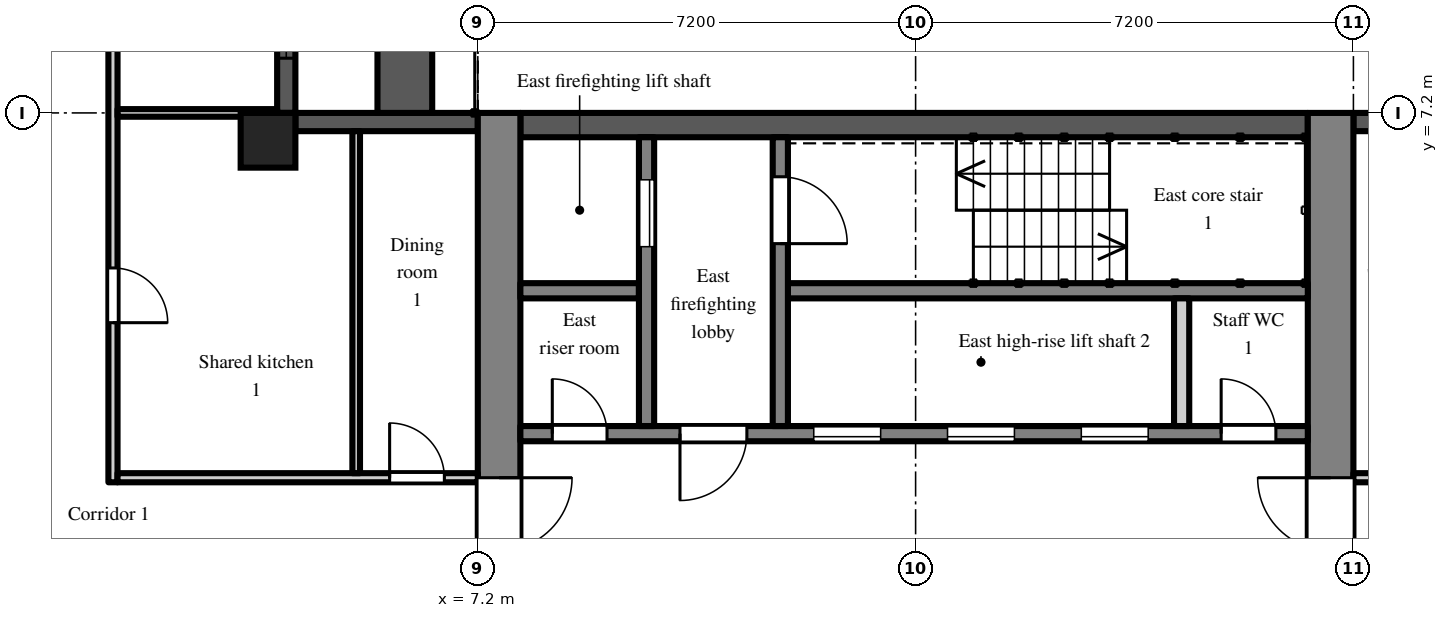
"""IFC4 building model, lengths in metres.
Left out: names, types, materials, properties, quantities, classifications, styles, units other than length and angle.
Written with IfcOpenShell. Run it as: python <this file> out.ifc"""

import sys

from ifc_helpers import new_model, si_unit, direction, frame, frame_2d, origin, origin_2d, place, context, subcontext, project, spatial, rectangle, extrude, element, fill, save


model = new_model("IFC4")
c1 = context("Model", 3, precision=1e-05, world=origin(), true_north=direction((0.0, 1.0)))
c2 = subcontext(c1, "Body", "Model", "MODEL_VIEW")
j1 = project(units=[si_unit("LENGTHUNIT", "METRE"), si_unit("PLANEANGLEUNIT", "RADIAN")], contexts=[c1])
p1 = place(None, origin())
s1 = spatial("IfcSite", under=j1, at=p1, CompositionType="ELEMENT")
p2 = place(p1, origin())
s2 = spatial("IfcBuilding", under=s1, at=p2, CompositionType="ELEMENT")
p3 = place(p2, frame((0.0, 0.0, 225.9)))
s3 = spatial("IfcBuildingStorey", under=s2, at=p3, CompositionType="ELEMENT", Elevation=225.9)
p4 = place(p3, frame((3.75, 6.75, 0.0), z_axis=(0.0, 0.0, 1.0), x_axis=(1.0, 0.0, 0.0)))
e1 = element("IfcColumn", 1, at=p4, inside=s3, PredefinedType="COLUMN", context=c2, shape_type="SweptSolid", body=[
    extrude(rectangle(XDim=0.9, YDim=0.9, at=origin_2d()), origin(), (0.0, 0.0, 1.0), 3.0),
])
p5 = place(p3, frame((24.3, 7.05, 0.0), z_axis=(0.0, 0.0, 1.0), x_axis=(-1.0, 0.0, 0.0)))
e2 = element("IfcWall", 2, at=p5, inside=s3, PredefinedType="SOLIDWALL", context=c2, shape_type="SweptSolid", body=[
    extrude(rectangle(XDim=2.7, YDim=0.3, at=frame_2d((1.35, 0.0))), origin(), (0.0, 0.0, 1.0), 2.3),
])
p6 = place(p5, frame((0.75, 0.0, 0.2)))
e3 = element("IfcOpeningElement", 3, at=p6, cuts=e2, PredefinedType="OPENING", context=c2, shape_type="SweptSolid", body=[
    extrude(rectangle(XDim=1.2, YDim=1.85, at=frame_2d((0.6, 0.925))), frame((0.0, 0.16, 0.0), z_axis=(0.0, -1.0, 0.0), x_axis=(1.0, 0.0, 0.0)), (0.0, 0.0, 1.0), 0.32),
])
p7 = place(p3, frame((7.2, 7.05, 0.0), z_axis=(0.0, 0.0, 1.0), x_axis=(-1.0, 0.0, 0.0)))
e4 = element("IfcWall", 4, at=p7, inside=s3, PredefinedType="SOLIDWALL", context=c2, shape_type="SweptSolid", body=[
    extrude(rectangle(XDim=3.0, YDim=0.3, at=frame_2d((1.5, 0.0))), origin(), (0.0, 0.0, 1.0), 2.3),
])
p8 = place(p3, frame((4.05, 7.2, 0.0), z_axis=(0.0, 0.0, 1.0), x_axis=(0.0, 1.0, 0.0)))
e5 = element("IfcWall", 5, at=p8, inside=s3, PredefinedType="SOLIDWALL", context=c2, shape_type="SweptSolid", body=[
    extrude(rectangle(XDim=7.2, YDim=0.3, at=frame_2d((3.6, 0.0))), origin(), (0.0, 0.0, 1.0), 2.3),
])
p9 = place(p8, frame((3.0, 0.0, 0.0)))
e6 = element("IfcOpeningElement", 6, at=p9, cuts=e5, PredefinedType="OPENING", context=c2, shape_type="SweptSolid", body=[
    extrude(rectangle(XDim=1.2, YDim=2.05, at=frame_2d((0.6, 1.025))), frame((0.0, 0.16, 0.0), z_axis=(0.0, -1.0, 0.0), x_axis=(1.0, 0.0, 0.0)), (0.0, 0.0, 1.0), 0.32),
])
p10 = place(p8, frame((0.9, 0.0, 0.2)))
e7 = element("IfcOpeningElement", 7, at=p10, cuts=e5, PredefinedType="OPENING", context=c2, shape_type="SweptSolid", body=[
    extrude(rectangle(XDim=1.8, YDim=1.85, at=frame_2d((0.9, 0.925))), frame((0.0, 0.16, 0.0), z_axis=(0.0, -1.0, 0.0), x_axis=(1.0, 0.0, 0.0)), (0.0, 0.0, 1.0), 0.32),
])
p11 = place(p8, frame((4.5, 0.0, 0.2)))
e8 = element("IfcOpeningElement", 8, at=p11, cuts=e5, PredefinedType="OPENING", context=c2, shape_type="SweptSolid", body=[
    extrude(rectangle(XDim=1.8, YDim=1.85, at=frame_2d((0.9, 0.925))), frame((0.0, 0.16, 0.0), z_axis=(0.0, -1.0, 0.0), x_axis=(1.0, 0.0, 0.0)), (0.0, 0.0, 1.0), 0.32),
])
p12 = place(p3, frame((6.0, 7.2, 0.0), z_axis=(0.0, 0.0, 1.0), x_axis=(0.0, 1.0, 0.0)))
e9 = element("IfcWall", 9, at=p12, inside=s3, PredefinedType="PARAPET", context=c2, shape_type="SweptSolid", body=[
    extrude(rectangle(XDim=7.2, YDim=0.9, at=frame_2d((3.6, 0.0))), origin(), (0.0, 0.0, 1.0), 0.8),
])
p13 = place(p3, frame((7.55, -7.2, 0.0), z_axis=(0.0, 0.0, 1.0), x_axis=(0.0, 1.0, 0.0)))
e10 = element("IfcWall", 10, at=p13, inside=s3, PredefinedType="SHEAR", context=c2, shape_type="SweptSolid", body=[
    extrude(rectangle(XDim=14.4, YDim=0.7, at=frame_2d((7.2, 0.0))), origin(), (0.0, 0.0, 1.0), 2.6),
])
p14 = place(p13, frame((6.0, 0.0, 0.0)))
e11 = element("IfcOpeningElement", 11, at=p14, cuts=e10, PredefinedType="OPENING", context=c2, shape_type="SweptSolid", body=[
    extrude(rectangle(XDim=2.4, YDim=2.2, at=frame_2d((1.2, 1.1))), frame((0.0, 0.36, 0.0), z_axis=(0.0, -1.0, 0.0), x_axis=(1.0, 0.0, 0.0)), (0.0, 0.0, 1.0), 0.72),
])
p15 = place(p3, frame((21.225, -7.2, 0.0), z_axis=(0.0, 0.0, 1.0), x_axis=(0.0, 1.0, 0.0)))
e12 = element("IfcWall", 12, at=p15, inside=s3, PredefinedType="SHEAR", context=c2, shape_type="SweptSolid", body=[
    extrude(rectangle(XDim=14.4, YDim=0.75, at=frame_2d((7.2, 0.0))), origin(), (0.0, 0.0, 1.0), 2.6),
])
p16 = place(p15, frame((6.0, 0.0, 0.0)))
e13 = element("IfcOpeningElement", 13, at=p16, cuts=e12, PredefinedType="OPENING", context=c2, shape_type="SweptSolid", body=[
    extrude(rectangle(XDim=2.4, YDim=2.2, at=frame_2d((1.2, 1.1))), frame((0.0, 0.385, 0.0), z_axis=(0.0, -1.0, 0.0), x_axis=(1.0, 0.0, 0.0)), (0.0, 0.0, 1.0), 0.77),
])
p17 = place(p3, frame((7.9, 7.0, 0.0), z_axis=(0.0, 0.0, 1.0), x_axis=(1.0, 0.0, 0.0)))
e14 = element("IfcWall", 14, at=p17, inside=s3, PredefinedType="SHEAR", context=c2, shape_type="SweptSolid", body=[
    extrude(rectangle(XDim=12.95, YDim=0.4, at=frame_2d((6.475, 0.0))), origin(), (0.0, 0.0, 1.0), 2.6),
])
p18 = place(p3, frame((7.9, 1.925, 0.0), z_axis=(0.0, 0.0, 1.0), x_axis=(1.0, 0.0, 0.0)))
e15 = element("IfcWall", 15, at=p18, inside=s3, PredefinedType="SHEAR", context=c2, shape_type="SweptSolid", body=[
    extrude(rectangle(XDim=12.95, YDim=0.25, at=frame_2d((6.475, 0.0))), origin(), (0.0, 0.0, 1.0), 2.6),
])
p19 = place(p18, frame((4.825, 0.0, 0.0)))
e16 = element("IfcOpeningElement", 16, at=p19, cuts=e15, PredefinedType="OPENING", context=c2, shape_type="SweptSolid", body=[
    extrude(rectangle(XDim=1.1, YDim=2.1, at=frame_2d((0.55, 1.05))), frame((0.0, 0.135, 0.0), z_axis=(0.0, -1.0, 0.0), x_axis=(1.0, 0.0, 0.0)), (0.0, 0.0, 1.0), 0.27),
])
p20 = place(p18, frame((7.025, 0.0, 0.0)))
e17 = element("IfcOpeningElement", 17, at=p20, cuts=e15, PredefinedType="OPENING", context=c2, shape_type="SweptSolid", body=[
    extrude(rectangle(XDim=1.1, YDim=2.1, at=frame_2d((0.55, 1.05))), frame((0.0, 0.135, 0.0), z_axis=(0.0, -1.0, 0.0), x_axis=(1.0, 0.0, 0.0)), (0.0, 0.0, 1.0), 0.27),
])
p21 = place(p18, frame((9.225, 0.0, 0.0)))
e18 = element("IfcOpeningElement", 18, at=p21, cuts=e15, PredefinedType="OPENING", context=c2, shape_type="SweptSolid", body=[
    extrude(rectangle(XDim=1.1, YDim=2.1, at=frame_2d((0.55, 1.05))), frame((0.0, 0.135, 0.0), z_axis=(0.0, -1.0, 0.0), x_axis=(1.0, 0.0, 0.0)), (0.0, 0.0, 1.0), 0.27),
])
p22 = place(p18, frame((0.525, 0.0, 0.0)))
e19 = element("IfcOpeningElement", 19, at=p22, cuts=e15, PredefinedType="OPENING", context=c2, shape_type="SweptSolid", body=[
    extrude(rectangle(XDim=0.9, YDim=2.1, at=frame_2d((0.45, 1.05))), frame((0.0, 0.135, 0.0), z_axis=(0.0, -1.0, 0.0), x_axis=(1.0, 0.0, 0.0)), (0.0, 0.0, 1.0), 0.27),
])
p23 = place(p18, frame((2.625, 0.0, 0.0)))
e20 = element("IfcOpeningElement", 20, at=p23, cuts=e15, PredefinedType="OPENING", context=c2, shape_type="SweptSolid", body=[
    extrude(rectangle(XDim=1.1, YDim=2.1, at=frame_2d((0.55, 1.05))), frame((0.0, 0.135, 0.0), z_axis=(0.0, -1.0, 0.0), x_axis=(1.0, 0.0, 0.0)), (0.0, 0.0, 1.0), 0.27),
])
p24 = place(p18, frame((11.525, 0.0, 0.0)))
e21 = element("IfcOpeningElement", 21, at=p24, cuts=e15, PredefinedType="OPENING", context=c2, shape_type="SweptSolid", body=[
    extrude(rectangle(XDim=0.9, YDim=2.1, at=frame_2d((0.45, 1.05))), frame((0.0, 0.135, 0.0), z_axis=(0.0, -1.0, 0.0), x_axis=(1.0, 0.0, 0.0)), (0.0, 0.0, 1.0), 0.27),
])
p25 = place(p3, frame((7.9, 4.275, 0.0), z_axis=(0.0, 0.0, 1.0), x_axis=(1.0, 0.0, 0.0)))
e22 = element("IfcWall", 22, at=p25, inside=s3, PredefinedType="SHEAR", context=c2, shape_type="SweptSolid", body=[
    extrude(rectangle(XDim=1.95, YDim=0.25, at=frame_2d((0.975, 0.0))), origin(), (0.0, 0.0, 1.0), 2.6),
])
p26 = place(p3, frame((12.3, 4.275, 0.0), z_axis=(0.0, 0.0, 1.0), x_axis=(1.0, 0.0, 0.0)))
e23 = element("IfcWall", 23, at=p26, inside=s3, PredefinedType="SHEAR", context=c2, shape_type="SweptSolid", body=[
    extrude(rectangle(XDim=8.55, YDim=0.25, at=frame_2d((4.275, 0.0))), origin(), (0.0, 0.0, 1.0), 2.6),
])
p27 = place(p3, frame((9.975, 2.05, 0.0), z_axis=(0.0, 0.0, 1.0), x_axis=(0.0, 1.0, 0.0)))
e24 = element("IfcWall", 24, at=p27, inside=s3, PredefinedType="SHEAR", context=c2, shape_type="SweptSolid", body=[
    extrude(rectangle(XDim=4.75, YDim=0.25, at=frame_2d((2.375, 0.0))), origin(), (0.0, 0.0, 1.0), 2.6),
])
p28 = place(p27, frame((2.95, 0.0, 0.0)))
e25 = element("IfcOpeningElement", 25, at=p28, cuts=e24, PredefinedType="OPENING", context=c2, shape_type="SweptSolid", body=[
    extrude(rectangle(XDim=1.1, YDim=2.1, at=frame_2d((0.55, 1.05))), frame((0.0, 0.135, 0.0), z_axis=(0.0, -1.0, 0.0), x_axis=(1.0, 0.0, 0.0)), (0.0, 0.0, 1.0), 0.27),
])
p29 = place(p3, frame((12.175, 2.05, 0.0), z_axis=(0.0, 0.0, 1.0), x_axis=(0.0, 1.0, 0.0)))
e26 = element("IfcWall", 26, at=p29, inside=s3, PredefinedType="SHEAR", context=c2, shape_type="SweptSolid", body=[
    extrude(rectangle(XDim=4.75, YDim=0.25, at=frame_2d((2.375, 0.0))), origin(), (0.0, 0.0, 1.0), 2.6),
])
p30 = place(p29, frame((3.0, 0.0, 0.0)))
e27 = element("IfcOpeningElement", 27, at=p30, cuts=e26, PredefinedType="OPENING", context=c2, shape_type="SweptSolid", body=[
    extrude(rectangle(XDim=1.1, YDim=2.1, at=frame_2d((0.55, 1.05))), frame((0.0, 0.135, 0.0), z_axis=(0.0, -1.0, 0.0), x_axis=(1.0, 0.0, 0.0)), (0.0, 0.0, 1.0), 0.27),
])
p31 = place(p3, frame((18.775, 2.05, 0.0), z_axis=(0.0, 0.0, 1.0), x_axis=(0.0, 1.0, 0.0)))
e28 = element("IfcWall", 28, at=p31, inside=s3, PredefinedType="PARTITIONING", context=c2, shape_type="SweptSolid", body=[
    extrude(rectangle(XDim=2.1, YDim=0.25, at=frame_2d((1.05, 0.0))), origin(), (0.0, 0.0, 1.0), 2.6),
])
p32 = place(p3, frame((1.2, 1.125, 0.0), z_axis=(0.0, 0.0, 1.0), x_axis=(0.0, 1.0, 0.0)))
e29 = element("IfcWall", 29, at=p32, inside=s3, PredefinedType="PARTITIONING", context=c2, shape_type="SweptSolid", body=[
    extrude(rectangle(XDim=18.4, YDim=0.15, at=frame_2d((9.2, 0.0))), origin(), (0.0, 0.0, 1.0), 2.6),
])
p33 = place(p32, frame((2.625, 0.0, 0.0)))
e30 = element("IfcOpeningElement", 30, at=p33, cuts=e29, PredefinedType="OPENING", context=c2, shape_type="SweptSolid", body=[
    extrude(rectangle(XDim=0.9, YDim=2.1, at=frame_2d((0.45, 1.05))), frame((0.0, 0.085, 0.0), z_axis=(0.0, -1.0, 0.0), x_axis=(1.0, 0.0, 0.0)), (0.0, 0.0, 1.0), 0.17),
])
p34 = place(p32, frame((7.425, 0.0, 0.0)))
e31 = element("IfcOpeningElement", 31, at=p34, cuts=e29, PredefinedType="OPENING", context=c2, shape_type="SweptSolid", body=[
    extrude(rectangle(XDim=0.9, YDim=2.1, at=frame_2d((0.45, 1.05))), frame((0.0, 0.085, 0.0), z_axis=(0.0, -1.0, 0.0), x_axis=(1.0, 0.0, 0.0)), (0.0, 0.0, 1.0), 0.17),
])
p35 = place(p32, frame((13.475, 0.0, 0.0)))
e32 = element("IfcOpeningElement", 32, at=p35, cuts=e29, PredefinedType="OPENING", context=c2, shape_type="SweptSolid", body=[
    extrude(rectangle(XDim=1.0, YDim=2.1, at=frame_2d((0.5, 1.05))), frame((0.0, 0.085, 0.0), z_axis=(0.0, -1.0, 0.0), x_axis=(1.0, 0.0, 0.0)), (0.0, 0.0, 1.0), 0.17),
])
p36 = place(p3, frame((1.275, 1.2, 0.0), z_axis=(0.0, 0.0, 1.0), x_axis=(1.0, 0.0, 0.0)))
e33 = element("IfcWall", 33, at=p36, inside=s3, PredefinedType="PARTITIONING", context=c2, shape_type="SweptSolid", body=[
    extrude(rectangle(XDim=5.925, YDim=0.15, at=frame_2d((2.962, 0.0))), origin(), (0.0, 0.0, 1.0), 2.6),
])
p37 = place(p36, frame((4.475, 0.0, 0.0)))
e34 = element("IfcOpeningElement", 34, at=p37, cuts=e33, PredefinedType="OPENING", context=c2, shape_type="SweptSolid", body=[
    extrude(rectangle(XDim=0.9, YDim=2.1, at=frame_2d((0.45, 1.05))), frame((0.0, 0.085, 0.0), z_axis=(0.0, -1.0, 0.0), x_axis=(1.0, 0.0, 0.0)), (0.0, 0.0, 1.0), 0.17),
])
p38 = place(p3, frame((1.275, 7.2, 0.0), z_axis=(0.0, 0.0, 1.0), x_axis=(1.0, 0.0, 0.0)))
e35 = element("IfcWall", 35, at=p38, inside=s3, PredefinedType="PARTITIONING", context=c2, shape_type="SweptSolid", body=[
    extrude(rectangle(XDim=2.625, YDim=0.125, at=frame_2d((1.312, 0.0))), origin(), (0.0, 0.0, 1.0), 2.6),
])
p39 = place(p3, frame((5.2, 1.275, 0.0), z_axis=(0.0, 0.0, 1.0), x_axis=(0.0, 1.0, 0.0)))
e36 = element("IfcWall", 36, at=p39, inside=s3, PredefinedType="PARTITIONING", context=c2, shape_type="SweptSolid", body=[
    extrude(rectangle(XDim=5.625, YDim=0.125, at=frame_2d((2.812, 0.0))), origin(), (0.0, 0.0, 1.0), 2.6),
])
p40 = place(p3, frame((21.6, 1.2, 0.0), z_axis=(0.0, 0.0, 1.0), x_axis=(1.0, 0.0, 0.0)))
e37 = element("IfcWall", 37, at=p40, inside=s3, PredefinedType="PARTITIONING", context=c2, shape_type="SweptSolid", body=[
    extrude(rectangle(XDim=5.125, YDim=0.15, at=frame_2d((2.562, 0.0))), origin(), (0.0, 0.0, 1.0), 2.6),
])
p41 = place(p40, frame((0.6, 0.0, 0.0)))
e38 = element("IfcOpeningElement", 38, at=p41, cuts=e37, PredefinedType="OPENING", context=c2, shape_type="SweptSolid", body=[
    extrude(rectangle(XDim=1.0, YDim=2.1, at=frame_2d((0.5, 1.05))), frame((0.0, 0.085, 0.0), z_axis=(0.0, -1.0, 0.0), x_axis=(1.0, 0.0, 0.0)), (0.0, 0.0, 1.0), 0.17),
])
p42 = place(p10, origin())
e39 = element("IfcWindow", 39, at=p42, inside=s3, PartitioningType="SINGLE_PANEL", PredefinedType="WINDOW", context=c2, shape_type="SweptSolid", body=[
    extrude(rectangle(XDim=1.8, YDim=1.85, at=frame_2d((0.9, 0.925))), frame((0.0, 0.03, 0.0), z_axis=(0.0, -1.0, 0.0), x_axis=(1.0, 0.0, 0.0)), (0.0, 0.0, 1.0), 0.06),
])
fill(e7, e39)
p43 = place(p19, origin())
e40 = element("IfcDoor", 40, at=p43, inside=s3, OperationType="SLIDING_TO_LEFT", PredefinedType="DOOR", context=c2, shape_type="SweptSolid", body=[
    extrude(rectangle(XDim=1.1, YDim=2.1, at=frame_2d((0.55, 1.05))), frame((0.0, 0.025, 0.0), z_axis=(0.0, -1.0, 0.0), x_axis=(1.0, 0.0, 0.0)), (0.0, 0.0, 1.0), 0.05),
])
fill(e16, e40)
p44 = place(p20, origin())
e41 = element("IfcDoor", 41, at=p44, inside=s3, OperationType="SLIDING_TO_LEFT", PredefinedType="DOOR", context=c2, shape_type="SweptSolid", body=[
    extrude(rectangle(XDim=1.1, YDim=2.1, at=frame_2d((0.55, 1.05))), frame((0.0, 0.025, 0.0), z_axis=(0.0, -1.0, 0.0), x_axis=(1.0, 0.0, 0.0)), (0.0, 0.0, 1.0), 0.05),
])
fill(e17, e41)
p45 = place(p21, origin())
e42 = element("IfcDoor", 42, at=p45, inside=s3, OperationType="SLIDING_TO_LEFT", PredefinedType="DOOR", context=c2, shape_type="SweptSolid", body=[
    extrude(rectangle(XDim=1.1, YDim=2.1, at=frame_2d((0.55, 1.05))), frame((0.0, 0.025, 0.0), z_axis=(0.0, -1.0, 0.0), x_axis=(1.0, 0.0, 0.0)), (0.0, 0.0, 1.0), 0.05),
])
fill(e18, e42)
p46 = place(p28, origin())
e43 = element("IfcDoor", 43, at=p46, inside=s3, OperationType="SLIDING_TO_LEFT", PredefinedType="DOOR", context=c2, shape_type="SweptSolid", body=[
    extrude(rectangle(XDim=1.1, YDim=2.1, at=frame_2d((0.55, 1.05))), frame((0.0, 0.025, 0.0), z_axis=(0.0, -1.0, 0.0), x_axis=(1.0, 0.0, 0.0)), (0.0, 0.0, 1.0), 0.05),
])
fill(e25, e43)
p47 = place(p30, frame((1.1, 0.0, 0.0), z_axis=(0.0, 0.0, 1.0), x_axis=(-1.0, 0.0, 0.0)))
e44 = element("IfcDoor", 44, at=p47, inside=s3, OperationType="SINGLE_SWING_RIGHT", PredefinedType="DOOR", context=c2, shape_type="SweptSolid", body=[
    extrude(rectangle(XDim=1.1, YDim=2.1, at=frame_2d((0.55, 1.05))), frame((0.0, 0.025, 0.0), z_axis=(0.0, -1.0, 0.0), x_axis=(1.0, 0.0, 0.0)), (0.0, 0.0, 1.0), 0.05),
])
fill(e27, e44)
p48 = place(p22, origin())
e45 = element("IfcDoor", 45, at=p48, inside=s3, OperationType="SINGLE_SWING_LEFT", PredefinedType="DOOR", context=c2, shape_type="SweptSolid", body=[
    extrude(rectangle(XDim=0.9, YDim=2.1, at=frame_2d((0.45, 1.05))), frame((0.0, 0.025, 0.0), z_axis=(0.0, -1.0, 0.0), x_axis=(1.0, 0.0, 0.0)), (0.0, 0.0, 1.0), 0.05),
])
fill(e19, e45)
p49 = place(p23, frame((1.1, 0.0, 0.0), z_axis=(0.0, 0.0, 1.0), x_axis=(-1.0, 0.0, 0.0)))
e46 = element("IfcDoor", 46, at=p49, inside=s3, OperationType="SINGLE_SWING_RIGHT", PredefinedType="DOOR", context=c2, shape_type="SweptSolid", body=[
    extrude(rectangle(XDim=1.1, YDim=2.1, at=frame_2d((0.55, 1.05))), frame((0.0, 0.025, 0.0), z_axis=(0.0, -1.0, 0.0), x_axis=(1.0, 0.0, 0.0)), (0.0, 0.0, 1.0), 0.05),
])
fill(e20, e46)
p50 = place(p14, frame((2.4, 0.0, 0.0), z_axis=(0.0, 0.0, 1.0), x_axis=(-1.0, 0.0, 0.0)))
e47 = element("IfcDoor", 47, at=p50, inside=s3, OperationType="DOUBLE_DOOR_DOUBLE_SWING", PredefinedType="DOOR", context=c2, shape_type="SweptSolid", body=[
    extrude(rectangle(XDim=2.4, YDim=2.2, at=frame_2d((1.2, 1.1))), frame((0.0, 0.025, 0.0), z_axis=(0.0, -1.0, 0.0), x_axis=(1.0, 0.0, 0.0)), (0.0, 0.0, 1.0), 0.05),
])
fill(e11, e47)
p51 = place(p16, origin())
e48 = element("IfcDoor", 48, at=p51, inside=s3, OperationType="DOUBLE_DOOR_DOUBLE_SWING", PredefinedType="DOOR", context=c2, shape_type="SweptSolid", body=[
    extrude(rectangle(XDim=2.4, YDim=2.2, at=frame_2d((1.2, 1.1))), frame((0.0, 0.025, 0.0), z_axis=(0.0, -1.0, 0.0), x_axis=(1.0, 0.0, 0.0)), (0.0, 0.0, 1.0), 0.05),
])
fill(e13, e48)
p52 = place(p24, origin())
e49 = element("IfcDoor", 49, at=p52, inside=s3, OperationType="SINGLE_SWING_LEFT", PredefinedType="DOOR", context=c2, shape_type="SweptSolid", body=[
    extrude(rectangle(XDim=0.9, YDim=2.1, at=frame_2d((0.45, 1.05))), frame((0.0, 0.025, 0.0), z_axis=(0.0, -1.0, 0.0), x_axis=(1.0, 0.0, 0.0)), (0.0, 0.0, 1.0), 0.05),
])
fill(e21, e49)
p53 = place(p33, frame((0.9, 0.0, 0.0), z_axis=(0.0, 0.0, 1.0), x_axis=(-1.0, 0.0, 0.0)))
e50 = element("IfcDoor", 50, at=p53, inside=s3, OperationType="SINGLE_SWING_RIGHT", PredefinedType="DOOR", context=c2, shape_type="SweptSolid", body=[
    extrude(rectangle(XDim=0.9, YDim=2.1, at=frame_2d((0.45, 1.05))), frame((0.0, 0.025, 0.0), z_axis=(0.0, -1.0, 0.0), x_axis=(1.0, 0.0, 0.0)), (0.0, 0.0, 1.0), 0.05),
])
fill(e30, e50)
p54 = place(p37, origin())
e51 = element("IfcDoor", 51, at=p54, inside=s3, OperationType="SINGLE_SWING_LEFT", PredefinedType="DOOR", context=c2, shape_type="SweptSolid", body=[
    extrude(rectangle(XDim=0.9, YDim=2.1, at=frame_2d((0.45, 1.05))), frame((0.0, 0.025, 0.0), z_axis=(0.0, -1.0, 0.0), x_axis=(1.0, 0.0, 0.0)), (0.0, 0.0, 1.0), 0.05),
])
fill(e34, e51)
save(model, sys.argv[1])
